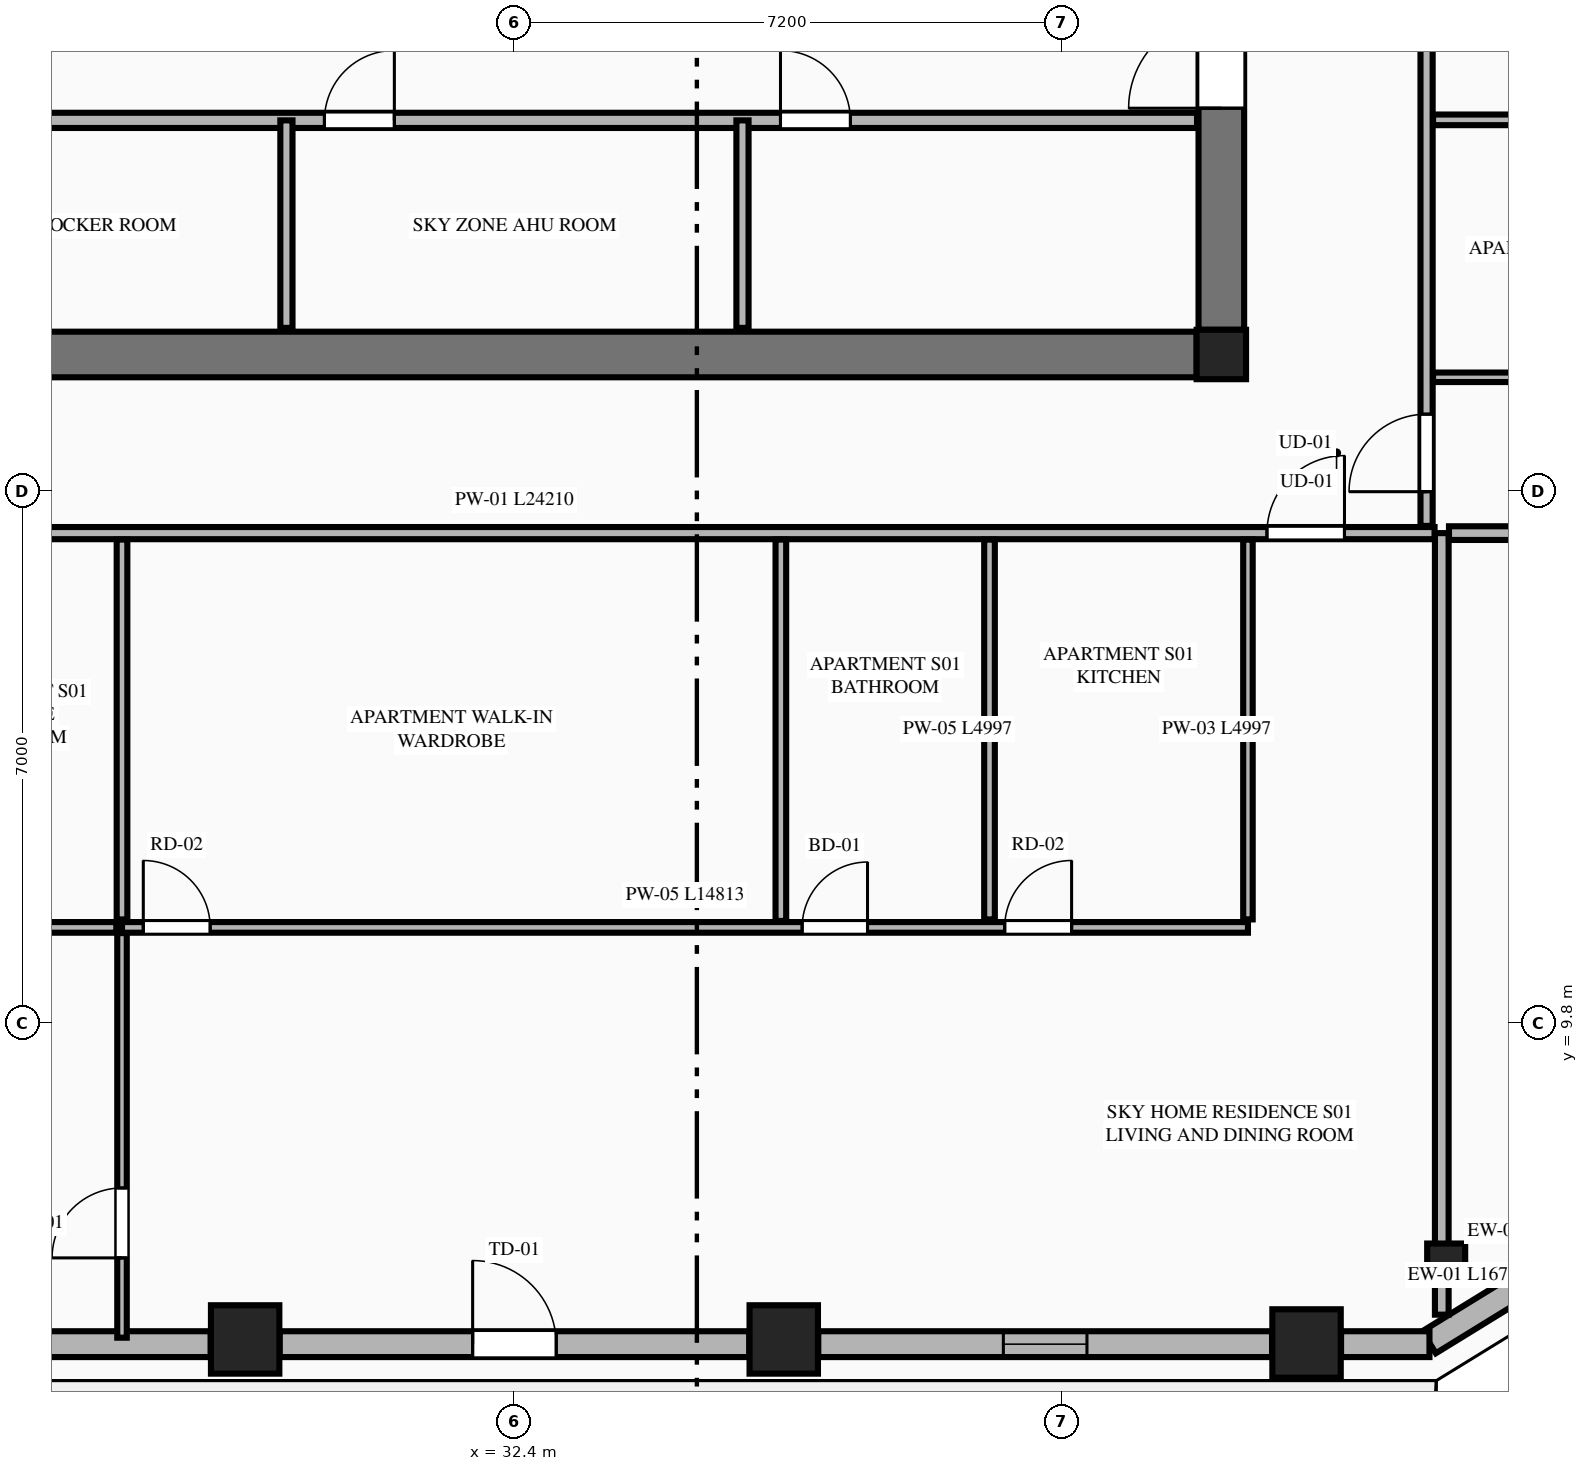
"""IFC4 building model, lengths in metres.
Left out: names, types, materials, properties, quantities, classifications, styles, units other than length and angle.
Written with IfcOpenShell. Run it as: python <this file> out.ifc"""

import sys

from ifc_helpers import new_model, si_unit, direction, frame, frame_2d, origin, origin_2d, place, context, subcontext, project, spatial, rectangle, extrude, element, fill, save


model = new_model("IFC4")
c1 = context("Model", 3, precision=1e-05, world=origin(), true_north=direction((0.0, 1.0)))
c2 = subcontext(c1, "Body", "Model", "MODEL_VIEW")
j1 = project(units=[si_unit("LENGTHUNIT", "METRE"), si_unit("PLANEANGLEUNIT", "RADIAN")], contexts=[c1])
p1 = place(None, origin())
s1 = spatial("IfcSite", under=j1, at=p1, CompositionType="ELEMENT")
p2 = place(p1, origin())
s2 = spatial("IfcBuilding", under=s1, at=p2, CompositionType="ELEMENT")
p3 = place(p2, frame((0.0, 0.0, 196.75)))
s3 = spatial("IfcBuildingStorey", under=s2, at=p3, CompositionType="ELEMENT", Elevation=196.75)
p4 = place(p3, frame((41.7, 18.6, 0.0), z_axis=(0.0, 0.0, 1.0), x_axis=(1.0, 0.0, 0.0)))
e1 = element("IfcColumn", 1, at=p4, inside=s3, PredefinedType="COLUMN", context=c2, shape_type="SweptSolid", body=[
    extrude(rectangle(XDim=0.65, YDim=0.65, at=origin_2d()), origin(), (0.0, 0.0, 1.0), 3.55),
])
p5 = place(p3, frame((23.425, 18.6, 0.0), z_axis=(0.0, 0.0, 1.0), x_axis=(1.0, 0.0, 0.0)))
e2 = element("IfcWall", 2, at=p5, inside=s3, PredefinedType="SHEAR", context=c2, shape_type="SweptSolid", body=[
    extrude(rectangle(XDim=17.95, YDim=0.6, at=frame_2d((8.975, 0.0))), origin(), (0.0, 0.0, 1.0), 3.35),
])
p6 = place(p3, frame((41.7, 18.925, 0.0), z_axis=(0.0, 0.0, 1.0), x_axis=(0.0, 1.0, 0.0)))
e3 = element("IfcWall", 3, at=p6, inside=s3, PredefinedType="SHEAR", context=c2, shape_type="SweptSolid", body=[
    extrude(rectangle(XDim=13.95, YDim=0.6, at=frame_2d((6.975, 0.0))), origin(), (0.0, 0.0, 1.0), 3.35),
])
p7 = place(p6, frame((2.915, 0.0, 0.0)))
e4 = element("IfcOpeningElement", 4, at=p7, cuts=e3, PredefinedType="OPENING", context=c2, shape_type="SweptSolid", body=[
    extrude(rectangle(XDim=1.22, YDim=2.25, at=frame_2d((0.61, 1.125))), frame((0.0, 0.31, 0.0), z_axis=(0.0, -1.0, 0.0), x_axis=(1.0, 0.0, 0.0)), (0.0, 0.0, 1.0), 0.62),
])
for number, where, z_axis, x_axis in (
    (5, (28.857, 5.642, 0.0), (0.0, 0.0, 1.0), (1.0, 0.0, 0.0)),
    (6, (35.943, 5.642, 0.0), (0.0, 0.0, 1.0), (1.0, 0.0, 0.0)),
    (7, (42.821, 5.589, 0.0), (0.0, 0.0, 1.0), (1.0, 0.0, 0.0)),
):
    element("IfcColumn", number, at=place(p3, frame(where, z_axis=z_axis, x_axis=x_axis)), inside=s3, PredefinedType="COLUMN", context=c2, shape_type="SweptSolid", body=[
        extrude(rectangle(XDim=0.9, YDim=0.9, at=origin_2d()), origin(), (0.0, 0.0, 1.0), 3.55),
    ])
p8 = place(p3, frame((44.658, 6.654, 0.0), z_axis=(0.0, 0.0, 1.0), x_axis=(0.865230187018, 0.501374833306, 0.0)))
e8 = element("IfcColumn", 8, at=p8, inside=s3, PredefinedType="PILASTER", context=c2, shape_type="SweptSolid", body=[
    extrude(rectangle(XDim=0.5, YDim=0.35, at=origin_2d()), origin(), (0.0, 0.0, 1.0), 3.55),
])
p9 = place(p3, frame((23.42, 21.68, 0.0), z_axis=(0.0, 0.0, 1.0), x_axis=(1.0, 0.0, 0.0)))
e9 = element("IfcWall", 9, at=p9, inside=s3, PredefinedType="PLUMBINGWALL", context=c2, shape_type="SweptSolid", body=[
    extrude(rectangle(XDim=17.96, YDim=0.2, at=frame_2d((8.98, 0.0))), origin(), (0.0, 0.0, 1.0), 3.35),
])
p10 = place(p9, frame((0.46, 0.0, 0.0)))
e10 = element("IfcOpeningElement", 10, at=p10, cuts=e9, PredefinedType="OPENING", context=c2, shape_type="SweptSolid", body=[
    extrude(rectangle(XDim=0.92, YDim=2.15, at=frame_2d((0.46, 1.075))), frame((0.0, 0.11, 0.0), z_axis=(0.0, -1.0, 0.0), x_axis=(1.0, 0.0, 0.0)), (0.0, 0.0, 1.0), 0.22),
])
p11 = place(p9, frame((6.48, 0.0, 0.0)))
e11 = element("IfcOpeningElement", 11, at=p11, cuts=e9, PredefinedType="OPENING", context=c2, shape_type="SweptSolid", body=[
    extrude(rectangle(XDim=0.92, YDim=2.15, at=frame_2d((0.46, 1.075))), frame((0.0, 0.11, 0.0), z_axis=(0.0, -1.0, 0.0), x_axis=(1.0, 0.0, 0.0)), (0.0, 0.0, 1.0), 0.22),
])
p12 = place(p9, frame((12.48, 0.0, 0.0)))
e12 = element("IfcOpeningElement", 12, at=p12, cuts=e9, PredefinedType="OPENING", context=c2, shape_type="SweptSolid", body=[
    extrude(rectangle(XDim=0.92, YDim=2.15, at=frame_2d((0.46, 1.075))), frame((0.0, 0.11, 0.0), z_axis=(0.0, -1.0, 0.0), x_axis=(1.0, 0.0, 0.0)), (0.0, 0.0, 1.0), 0.22),
])
for number, where, z_axis, x_axis in (
    (13, (29.4, 18.95, 0.0), (0.0, 0.0, 1.0), (0.0, 1.0, 0.0)),
    (14, (35.4, 18.95, 0.0), (0.0, 0.0, 1.0), (0.0, 1.0, 0.0)),
):
    element("IfcWall", number, at=place(p3, frame(where, z_axis=z_axis, x_axis=x_axis)), inside=s3, PredefinedType="PARTITIONING", context=c2, shape_type="SweptSolid", body=[
        extrude(rectangle(XDim=2.73, YDim=0.16, at=frame_2d((1.365, 0.0))), origin(), (0.0, 0.0, 1.0), 3.35),
    ])
p13 = place(p3, frame((44.433, 5.605, 0.0), z_axis=(0.0, 0.0, 1.0), x_axis=(0.851778214877, 0.523902541185, 0.0)))
e15 = element("IfcWall", 15, at=p13, inside=s3, PredefinedType="STANDARD", context=c2, shape_type="SweptSolid", body=[
    extrude(rectangle(XDim=1.678, YDim=0.34, at=frame_2d((0.839, 0.0))), origin(), (0.0, 0.0, 1.0), 3.35),
])
p14 = place(p3, frame((22.433, 5.58, 0.0), z_axis=(0.0, 0.0, 1.0), x_axis=(1.0, 0.0, 0.0)))
e16 = element("IfcWall", 16, at=p14, inside=s3, PredefinedType="STANDARD", context=c2, shape_type="SweptSolid", body=[
    extrude(rectangle(XDim=5.97, YDim=0.34, at=frame_2d((2.985, 0.0))), origin(), (0.0, 0.0, 1.0), 2.883),
])
p15 = place(p14, frame((2.435, 0.0, 0.75)))
e17 = element("IfcOpeningElement", 17, at=p15, cuts=e16, PredefinedType="OPENING", context=c2, shape_type="SweptSolid", body=[
    extrude(rectangle(XDim=1.1, YDim=1.983, at=frame_2d((0.55, 0.991))), frame((0.0, 0.18, 0.0), z_axis=(0.0, -1.0, 0.0), x_axis=(1.0, 0.0, 0.0)), (0.0, 0.0, 1.0), 0.36),
])
p16 = place(p3, frame((29.311, 5.58, 0.0), z_axis=(0.0, 0.0, 1.0), x_axis=(1.0, 0.0, 0.0)))
e18 = element("IfcWall", 18, at=p16, inside=s3, PredefinedType="STANDARD", context=c2, shape_type="SweptSolid", body=[
    extrude(rectangle(XDim=6.178, YDim=0.34, at=frame_2d((3.089, 0.0))), origin(), (0.0, 0.0, 1.0), 2.883),
])
p17 = place(p16, frame((2.539, 0.0, 0.0)))
e19 = element("IfcOpeningElement", 19, at=p17, cuts=e18, PredefinedType="OPENING", context=c2, shape_type="SweptSolid", body=[
    extrude(rectangle(XDim=1.1, YDim=2.25, at=frame_2d((0.55, 1.125))), frame((0.0, 0.18, 0.0), z_axis=(0.0, -1.0, 0.0), x_axis=(1.0, 0.0, 0.0)), (0.0, 0.0, 1.0), 0.36),
])
p18 = place(p3, frame((36.397, 5.58, 0.0), z_axis=(0.0, 0.0, 1.0), x_axis=(1.0, 0.0, 0.0)))
e20 = element("IfcWall", 20, at=p18, inside=s3, PredefinedType="STANDARD", context=c2, shape_type="SweptSolid", body=[
    extrude(rectangle(XDim=5.97, YDim=0.34, at=frame_2d((2.985, 0.0))), origin(), (0.0, 0.0, 1.0), 2.883),
])
p19 = place(p18, frame((2.435, 0.0, 0.75)))
e21 = element("IfcOpeningElement", 21, at=p19, cuts=e20, PredefinedType="OPENING", context=c2, shape_type="SweptSolid", body=[
    extrude(rectangle(XDim=1.1, YDim=1.983, at=frame_2d((0.55, 0.991))), frame((0.0, 0.18, 0.0), z_axis=(0.0, -1.0, 0.0), x_axis=(1.0, 0.0, 0.0)), (0.0, 0.0, 1.0), 0.36),
])
p20 = place(p3, frame((43.275, 5.58, 0.0), z_axis=(0.0, 0.0, 1.0), x_axis=(1.0, 0.0, 0.0)))
e22 = element("IfcWall", 22, at=p20, inside=s3, PredefinedType="STANDARD", context=c2, shape_type="SweptSolid", body=[
    extrude(rectangle(XDim=1.163, YDim=0.34, at=frame_2d((0.582, 0.0))), origin(), (0.0, 0.0, 1.0), 3.35),
])
p21 = place(p3, frame((44.6, 5.968, 0.0), z_axis=(0.0, 0.0, 1.0), x_axis=(0.0, 1.0, 0.0)))
e23 = element("IfcWall", 23, at=p21, inside=s3, PredefinedType="PARTITIONING", context=c2, shape_type="SweptSolid", body=[
    extrude(rectangle(XDim=10.282, YDim=0.18, at=frame_2d((5.141, 0.0))), origin(), (0.0, 0.0, 1.0), 3.35),
])
p22 = place(p3, frame((20.295, 16.25, 0.0), z_axis=(0.0, 0.0, 1.0), x_axis=(1.0, 0.0, 0.0)))
e24 = element("IfcWall", 24, at=p22, inside=s3, PredefinedType="PARTITIONING", context=c2, shape_type="SweptSolid", body=[
    extrude(rectangle(XDim=24.21, YDim=0.16, at=frame_2d((12.105, 0.0))), origin(), (0.0, 0.0, 1.0), 3.35),
])
p23 = place(p22, frame((22.005, 0.0, 0.0)))
e25 = element("IfcOpeningElement", 25, at=p23, cuts=e24, PredefinedType="OPENING", context=c2, shape_type="SweptSolid", body=[
    extrude(rectangle(XDim=1.02, YDim=2.25, at=frame_2d((0.51, 1.125))), frame((0.0, 0.09, 0.0), z_axis=(0.0, -1.0, 0.0), x_axis=(1.0, 0.0, 0.0)), (0.0, 0.0, 1.0), 0.18),
])
p24 = place(p3, frame((42.05, 11.168, 0.0), z_axis=(0.0, 0.0, 1.0), x_axis=(0.0, 1.0, 0.0)))
e26 = element("IfcWall", 26, at=p24, inside=s3, PredefinedType="PARTITIONING", context=c2, shape_type="SweptSolid", body=[
    extrude(rectangle(XDim=4.997, YDim=0.125, at=frame_2d((2.499, 0.0))), origin(), (0.0, 0.0, 1.0), 2.807),
])
p25 = place(p3, frame((27.237, 11.063, 0.0), z_axis=(0.0, 0.0, 1.0), x_axis=(1.0, 0.0, 0.0)))
e27 = element("IfcWall", 27, at=p25, inside=s3, PredefinedType="PLUMBINGWALL", context=c2, shape_type="SweptSolid", body=[
    extrude(rectangle(XDim=14.813, YDim=0.14, at=frame_2d((7.406, 0.0))), origin(), (0.0, 0.0, 1.0), 3.35),
])
p26 = place(p25, frame((0.28, 0.0, 0.0)))
e28 = element("IfcOpeningElement", 28, at=p26, cuts=e27, PredefinedType="OPENING", context=c2, shape_type="SweptSolid", body=[
    extrude(rectangle(XDim=0.88, YDim=2.15, at=frame_2d((0.44, 1.075))), frame((0.0, 0.08, 0.0), z_axis=(0.0, -1.0, 0.0), x_axis=(1.0, 0.0, 0.0)), (0.0, 0.0, 1.0), 0.16),
])
p27 = place(p25, frame((8.948, 0.0, 0.0)))
e29 = element("IfcOpeningElement", 29, at=p27, cuts=e27, PredefinedType="OPENING", context=c2, shape_type="SweptSolid", body=[
    extrude(rectangle(XDim=0.86, YDim=2.1, at=frame_2d((0.43, 1.05))), frame((0.0, 0.08, 0.0), z_axis=(0.0, -1.0, 0.0), x_axis=(1.0, 0.0, 0.0)), (0.0, 0.0, 1.0), 0.16),
])
p28 = place(p25, frame((11.613, 0.0, 0.0)))
e30 = element("IfcOpeningElement", 30, at=p28, cuts=e27, PredefinedType="OPENING", context=c2, shape_type="SweptSolid", body=[
    extrude(rectangle(XDim=0.88, YDim=2.15, at=frame_2d((0.44, 1.075))), frame((0.0, 0.08, 0.0), z_axis=(0.0, -1.0, 0.0), x_axis=(1.0, 0.0, 0.0)), (0.0, 0.0, 1.0), 0.16),
])
p29 = place(p3, frame((20.295, 11.063, 0.0), z_axis=(0.0, 0.0, 1.0), x_axis=(1.0, 0.0, 0.0)))
e31 = element("IfcWall", 31, at=p29, inside=s3, PredefinedType="PLUMBINGWALL", context=c2, shape_type="SweptSolid", body=[
    extrude(rectangle(XDim=6.867, YDim=0.14, at=frame_2d((3.434, 0.0))), origin(), (0.0, 0.0, 1.0), 3.35),
])
p30 = place(p29, frame((0.28, 0.0, 0.0)))
e32 = element("IfcOpeningElement", 32, at=p30, cuts=e31, PredefinedType="OPENING", context=c2, shape_type="SweptSolid", body=[
    extrude(rectangle(XDim=0.88, YDim=2.15, at=frame_2d((0.44, 1.075))), frame((0.0, 0.08, 0.0), z_axis=(0.0, -1.0, 0.0), x_axis=(1.0, 0.0, 0.0)), (0.0, 0.0, 1.0), 0.16),
])
p31 = place(p29, frame((4.402, 0.0, 0.0)))
e33 = element("IfcOpeningElement", 33, at=p31, cuts=e31, PredefinedType="OPENING", context=c2, shape_type="SweptSolid", body=[
    extrude(rectangle(XDim=0.86, YDim=2.1, at=frame_2d((0.43, 1.05))), frame((0.0, 0.08, 0.0), z_axis=(0.0, -1.0, 0.0), x_axis=(1.0, 0.0, 0.0)), (0.0, 0.0, 1.0), 0.16),
])
for number, where, z_axis, x_axis in (
    (34, (38.65, 11.168, 0.0), (0.0, 0.0, 1.0), (0.0, 1.0, 0.0)),
    (35, (27.237, 11.168, 0.0), (0.0, 0.0, 1.0), (0.0, 1.0, 0.0)),
):
    element("IfcWall", number, at=place(p3, frame(where, z_axis=z_axis, x_axis=x_axis)), inside=s3, PredefinedType="PLUMBINGWALL", context=c2, shape_type="SweptSolid", body=[
        extrude(rectangle(XDim=4.997, YDim=0.14, at=frame_2d((2.499, 0.0))), origin(), (0.0, 0.0, 1.0), 3.35),
    ])
p32 = place(p3, frame((27.237, 5.665, 0.0), z_axis=(0.0, 0.0, 1.0), x_axis=(0.0, 1.0, 0.0)))
e36 = element("IfcWall", 36, at=p32, inside=s3, PredefinedType="PARTITIONING", context=c2, shape_type="SweptSolid", body=[
    extrude(rectangle(XDim=5.323, YDim=0.125, at=frame_2d((2.662, 0.0))), origin(), (0.0, 0.0, 1.0), 3.35),
])
p33 = place(p32, frame((1.05, 0.0, 0.0)))
e37 = element("IfcOpeningElement", 37, at=p33, cuts=e36, PredefinedType="OPENING", context=c2, shape_type="SweptSolid", body=[
    extrude(rectangle(XDim=0.92, YDim=2.15, at=frame_2d((0.46, 1.075))), frame((0.0, 0.073, 0.0), z_axis=(0.0, -1.0, 0.0), x_axis=(1.0, 0.0, 0.0)), (0.0, 0.0, 1.0), 0.145),
])
p34 = place(p3, frame((35.905, 11.148, 0.0), z_axis=(0.0, 0.0, 1.0), x_axis=(0.0, 1.0, 0.0)))
e38 = element("IfcWall", 38, at=p34, inside=s3, PredefinedType="PLUMBINGWALL", context=c2, shape_type="SweptSolid", body=[
    extrude(rectangle(XDim=5.017, YDim=0.14, at=frame_2d((2.509, 0.0))), origin(), (0.0, 0.0, 1.0), 2.807),
])
p35 = place(p3, frame((44.695, 16.25, 0.0), z_axis=(0.0, 0.0, 1.0), x_axis=(1.0, 0.0, 0.0)))
e39 = element("IfcWall", 39, at=p35, inside=s3, PredefinedType="PARTITIONING", context=c2, shape_type="SweptSolid", body=[
    extrude(rectangle(XDim=5.894, YDim=0.18, at=frame_2d((2.947, 0.0))), origin(), (0.0, 0.0, 1.0), 3.35),
])
p36 = place(p3, frame((44.4, 16.345, 0.0), z_axis=(0.0, 0.0, 1.0), x_axis=(0.0, 1.0, 0.0)))
e40 = element("IfcWall", 40, at=p36, inside=s3, PredefinedType="PARTITIONING", context=c2, shape_type="SweptSolid", body=[
    extrude(rectangle(XDim=18.71, YDim=0.16, at=frame_2d((9.355, 0.0))), origin(), (0.0, 0.0, 1.0), 3.35),
])
p37 = place(p36, frame((0.45, 0.0, 0.0)))
e41 = element("IfcOpeningElement", 41, at=p37, cuts=e40, PredefinedType="OPENING", context=c2, shape_type="SweptSolid", body=[
    extrude(rectangle(XDim=1.02, YDim=2.25, at=frame_2d((0.51, 1.125))), frame((0.0, 0.09, 0.0), z_axis=(0.0, -1.0, 0.0), x_axis=(1.0, 0.0, 0.0)), (0.0, 0.0, 1.0), 0.18),
])
p38 = place(p3, frame((44.485, 18.3, 0.0), z_axis=(0.0, 0.0, 1.0), x_axis=(1.0, 0.0, 0.0)))
e42 = element("IfcWall", 42, at=p38, inside=s3, PredefinedType="PARTITIONING", context=c2, shape_type="SweptSolid", body=[
    extrude(rectangle(XDim=3.88, YDim=0.125, at=frame_2d((1.94, 0.0))), origin(), (0.0, 0.0, 1.0), 2.807),
])
p39 = place(p3, frame((44.485, 21.687, 0.0), z_axis=(0.0, 0.0, 1.0), x_axis=(1.0, 0.0, 0.0)))
e43 = element("IfcWall", 43, at=p39, inside=s3, PredefinedType="PLUMBINGWALL", context=c2, shape_type="SweptSolid", body=[
    extrude(rectangle(XDim=3.88, YDim=0.14, at=frame_2d((1.94, 0.0))), origin(), (0.0, 0.0, 1.0), 3.35),
])
p40 = place(p7, origin())
e44 = element("IfcDoor", 44, at=p40, inside=s3, OperationType="SINGLE_SWING_LEFT", PredefinedType="DOOR", context=c2, shape_type="SweptSolid", body=[
    extrude(rectangle(XDim=1.22, YDim=2.25, at=frame_2d((0.61, 1.125))), frame((0.0, 0.025, 0.0), z_axis=(0.0, -1.0, 0.0), x_axis=(1.0, 0.0, 0.0)), (0.0, 0.0, 1.0), 0.05),
])
fill(e4, e44)
p41 = place(p11, origin())
e45 = element("IfcDoor", 45, at=p41, inside=s3, OperationType="SINGLE_SWING_RIGHT", PredefinedType="DOOR", context=c2, shape_type="SweptSolid", body=[
    extrude(rectangle(XDim=0.92, YDim=2.15, at=frame_2d((0.46, 1.075))), frame((0.0, 0.025, 0.0), z_axis=(0.0, -1.0, 0.0), x_axis=(1.0, 0.0, 0.0)), (0.0, 0.0, 1.0), 0.05),
])
fill(e11, e45)
p42 = place(p12, origin())
e46 = element("IfcDoor", 46, at=p42, inside=s3, OperationType="SINGLE_SWING_LEFT", PredefinedType="DOOR", context=c2, shape_type="SweptSolid", body=[
    extrude(rectangle(XDim=0.92, YDim=2.15, at=frame_2d((0.46, 1.075))), frame((0.0, 0.025, 0.0), z_axis=(0.0, -1.0, 0.0), x_axis=(1.0, 0.0, 0.0)), (0.0, 0.0, 1.0), 0.05),
])
fill(e12, e46)
p43 = place(p17, origin())
e47 = element("IfcDoor", 47, at=p43, inside=s3, OperationType="SINGLE_SWING_LEFT", PredefinedType="DOOR", context=c2, shape_type="SweptSolid", body=[
    extrude(rectangle(XDim=1.1, YDim=2.25, at=frame_2d((0.55, 1.125))), frame((0.0, 0.025, 0.0), z_axis=(0.0, -1.0, 0.0), x_axis=(1.0, 0.0, 0.0)), (0.0, 0.0, 1.0), 0.05),
])
fill(e19, e47)
p44 = place(p19, origin())
e48 = element("IfcWindow", 48, at=p44, inside=s3, PartitioningType="SINGLE_PANEL", PredefinedType="WINDOW", context=c2, shape_type="SweptSolid", body=[
    extrude(rectangle(XDim=1.1, YDim=1.983, at=frame_2d((0.55, 0.991))), frame((0.0, 0.03, 0.0), z_axis=(0.0, -1.0, 0.0), x_axis=(1.0, 0.0, 0.0)), (0.0, 0.0, 1.0), 0.06),
])
fill(e21, e48)
p45 = place(p26, origin())
e49 = element("IfcDoor", 49, at=p45, inside=s3, OperationType="SINGLE_SWING_LEFT", PredefinedType="DOOR", context=c2, shape_type="SweptSolid", body=[
    extrude(rectangle(XDim=0.88, YDim=2.15, at=frame_2d((0.44, 1.075))), frame((0.0, 0.025, 0.0), z_axis=(0.0, -1.0, 0.0), x_axis=(1.0, 0.0, 0.0)), (0.0, 0.0, 1.0), 0.05),
])
fill(e28, e49)
p46 = place(p27, origin())
e50 = element("IfcDoor", 50, at=p46, inside=s3, OperationType="SINGLE_SWING_RIGHT", PredefinedType="DOOR", context=c2, shape_type="SweptSolid", body=[
    extrude(rectangle(XDim=0.86, YDim=2.1, at=frame_2d((0.43, 1.05))), frame((0.0, 0.025, 0.0), z_axis=(0.0, -1.0, 0.0), x_axis=(1.0, 0.0, 0.0)), (0.0, 0.0, 1.0), 0.05),
])
fill(e29, e50)
p47 = place(p23, origin())
e51 = element("IfcDoor", 51, at=p47, inside=s3, OperationType="SINGLE_SWING_RIGHT", PredefinedType="DOOR", context=c2, shape_type="SweptSolid", body=[
    extrude(rectangle(XDim=1.02, YDim=2.25, at=frame_2d((0.51, 1.125))), frame((0.0, 0.025, 0.0), z_axis=(0.0, -1.0, 0.0), x_axis=(1.0, 0.0, 0.0)), (0.0, 0.0, 1.0), 0.05),
])
fill(e25, e51)
p48 = place(p28, origin())
e52 = element("IfcDoor", 52, at=p48, inside=s3, OperationType="SINGLE_SWING_RIGHT", PredefinedType="DOOR", context=c2, shape_type="SweptSolid", body=[
    extrude(rectangle(XDim=0.88, YDim=2.15, at=frame_2d((0.44, 1.075))), frame((0.0, 0.025, 0.0), z_axis=(0.0, -1.0, 0.0), x_axis=(1.0, 0.0, 0.0)), (0.0, 0.0, 1.0), 0.05),
])
fill(e30, e52)
p49 = place(p33, origin())
e53 = element("IfcDoor", 53, at=p49, inside=s3, OperationType="SINGLE_SWING_LEFT", PredefinedType="DOOR", context=c2, shape_type="SweptSolid", body=[
    extrude(rectangle(XDim=0.92, YDim=2.15, at=frame_2d((0.46, 1.075))), frame((0.0, 0.025, 0.0), z_axis=(0.0, -1.0, 0.0), x_axis=(1.0, 0.0, 0.0)), (0.0, 0.0, 1.0), 0.05),
])
fill(e37, e53)
p50 = place(p37, origin())
e54 = element("IfcDoor", 54, at=p50, inside=s3, OperationType="SINGLE_SWING_LEFT", PredefinedType="DOOR", context=c2, shape_type="SweptSolid", body=[
    extrude(rectangle(XDim=1.02, YDim=2.25, at=frame_2d((0.51, 1.125))), frame((0.0, 0.025, 0.0), z_axis=(0.0, -1.0, 0.0), x_axis=(1.0, 0.0, 0.0)), (0.0, 0.0, 1.0), 0.05),
])
fill(e41, e54)
save(model, sys.argv[1])
